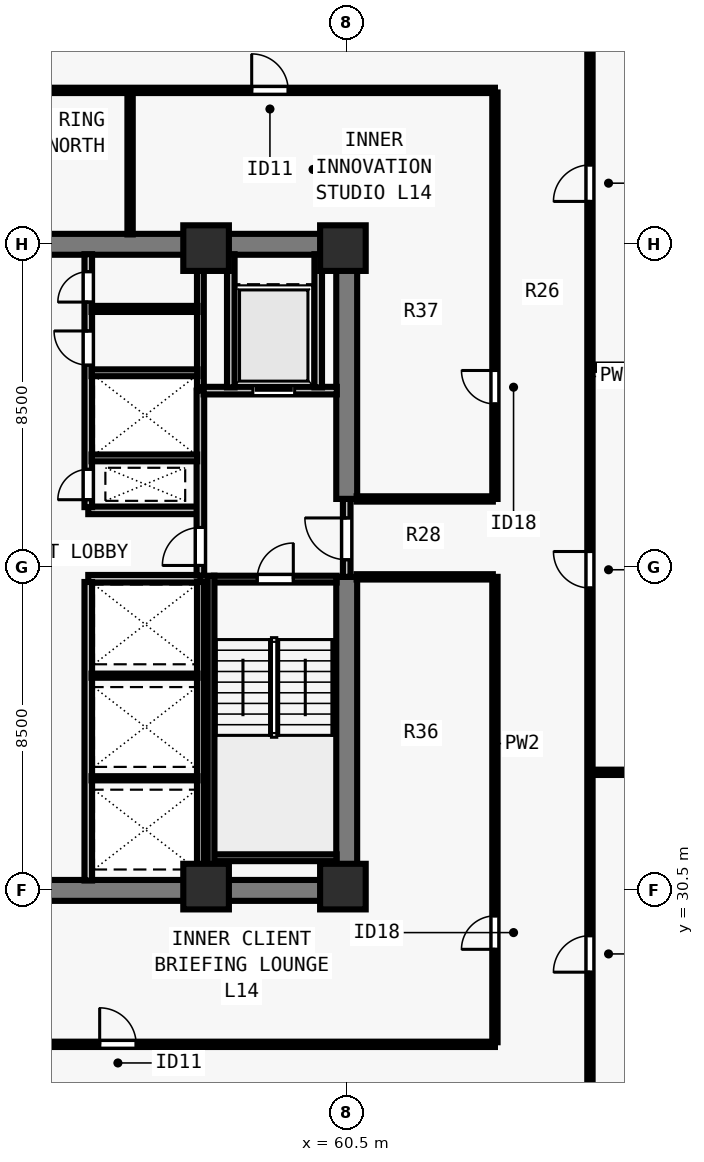
"""IFC4 building model, lengths in metres.
Left out: names, types, materials, properties, quantities, classifications, styles, units other than length and angle.
Written with IfcOpenShell. Run it as: python <this file> out.ifc"""

import sys

from ifc_helpers import new_model, si_unit, direction, frame, frame_2d, origin, origin_2d, place, context, subcontext, project, spatial, rectangle, extrude, element, fill, save


model = new_model("IFC4")
c1 = context("Model", 3, precision=1e-05, world=origin(), true_north=direction((0.0, 1.0)))
c2 = subcontext(c1, "Body", "Model", "MODEL_VIEW")
j1 = project(units=[si_unit("LENGTHUNIT", "METRE"), si_unit("PLANEANGLEUNIT", "RADIAN")], contexts=[c1])
p1 = place(None, origin())
s1 = spatial("IfcSite", under=j1, at=p1, CompositionType="ELEMENT")
p2 = place(p1, origin())
s2 = spatial("IfcBuilding", under=s1, at=p2, CompositionType="ELEMENT")
p3 = place(p2, frame((0.0, 0.0, 55.0)))
s3 = spatial("IfcBuildingStorey", under=s2, at=p3, CompositionType="ELEMENT", Elevation=55.0)
for number, where, z_axis, x_axis in (
    (1, (56.8, 30.6, 0.0), (0.0, 0.0, 1.0), (1.0, 0.0, 0.0)),
    (2, (60.4, 30.6, 0.0), (0.0, 0.0, 1.0), (1.0, 0.0, 0.0)),
    (3, (56.8, 47.4, 0.0), (0.0, 0.0, 1.0), (1.0, 0.0, 0.0)),
    (4, (60.4, 47.4, 0.0), (0.0, 0.0, 1.0), (1.0, 0.0, 0.0)),
):
    element("IfcColumn", number, at=place(p3, frame(where, z_axis=z_axis, x_axis=x_axis)), inside=s3, PredefinedType="COLUMN", context=c2, shape_type="SweptSolid", body=[
        extrude(rectangle(XDim=1.2, YDim=1.2, at=origin_2d()), origin(), (0.0, 0.0, 1.0), 3.5),
    ])
for number, where, z_axis, x_axis in (
    (5, (43.225, 30.5, 0.0), (0.0, 0.0, 1.0), (1.0, 0.0, 0.0)),
    (6, (43.225, 47.5, 0.0), (0.0, 0.0, 1.0), (1.0, 0.0, 0.0)),
):
    element("IfcWall", number, at=place(p3, frame(where, z_axis=z_axis, x_axis=x_axis)), inside=s3, PredefinedType="SHEAR", context=c2, shape_type="SweptSolid", body=[
        extrude(rectangle(XDim=17.55, YDim=0.55, at=frame_2d((8.775, 0.0))), origin(), (0.0, 0.0, 1.0), 3.28),
    ])
p4 = place(p3, frame((60.5, 30.765, 0.0), z_axis=(0.0, 0.0, 1.0), x_axis=(0.0, 1.0, 0.0)))
e7 = element("IfcWall", 7, at=p4, inside=s3, PredefinedType="SHEAR", context=c2, shape_type="SweptSolid", body=[
    extrude(rectangle(XDim=7.985, YDim=0.55, at=frame_2d((3.993, 0.0))), origin(), (0.0, 0.0, 1.0), 3.28),
])
p5 = place(p3, frame((60.5, 40.8, 0.0), z_axis=(0.0, 0.0, 1.0), x_axis=(0.0, 1.0, 0.0)))
e8 = element("IfcWall", 8, at=p5, inside=s3, PredefinedType="SHEAR", context=c2, shape_type="SweptSolid", body=[
    extrude(rectangle(XDim=6.435, YDim=0.55, at=frame_2d((3.218, 0.0))), origin(), (0.0, 0.0, 1.0), 3.28),
])
for number, where, z_axis, x_axis in (
    (9, (53.7, 38.7, 0.0), (0.0, 0.0, 1.0), (1.0, 0.0, 0.0)),
    (10, (53.7, 40.5, 0.0), (0.0, 0.0, 1.0), (1.0, 0.0, 0.0)),
):
    element("IfcWall", number, at=place(p3, frame(where, z_axis=z_axis, x_axis=x_axis)), inside=s3, PredefinedType="SOLIDWALL", context=c2, shape_type="SweptSolid", body=[
        extrude(rectangle(XDim=2.95, YDim=0.2, at=frame_2d((1.475, 0.0))), origin(), (0.0, 0.0, 1.0), 3.28),
    ])
p6 = place(p3, frame((53.7, 30.76, 0.0), z_axis=(0.0, 0.0, 1.0), x_axis=(0.0, 1.0, 0.0)))
e11 = element("IfcWall", 11, at=p6, inside=s3, PredefinedType="SOLIDWALL", context=c2, shape_type="SweptSolid", body=[
    extrude(rectangle(XDim=7.855, YDim=0.2, at=frame_2d((3.927, 0.0))), origin(), (0.0, 0.0, 1.0), 3.28),
])
p7 = place(p3, frame((53.7, 40.585, 0.0), z_axis=(0.0, 0.0, 1.0), x_axis=(0.0, 1.0, 0.0)))
e12 = element("IfcWall", 12, at=p7, inside=s3, PredefinedType="SOLIDWALL", context=c2, shape_type="SweptSolid", body=[
    extrude(rectangle(XDim=6.655, YDim=0.2, at=frame_2d((3.328, 0.0))), origin(), (0.0, 0.0, 1.0), 3.28),
])
p8 = place(p7, frame((0.195, 0.0, 0.0)))
e13 = element("IfcOpeningElement", 13, at=p8, cuts=e12, PredefinedType="OPENING", context=c2, shape_type="SweptSolid", body=[
    extrude(rectangle(XDim=0.8, YDim=2.08, at=frame_2d((0.4, 1.04))), frame((0.0, 0.11, 0.0), z_axis=(0.0, -1.0, 0.0), x_axis=(1.0, 0.0, 0.0)), (0.0, 0.0, 1.0), 0.22),
])
p9 = place(p7, frame((3.735, 0.0, 0.0)))
e14 = element("IfcOpeningElement", 14, at=p9, cuts=e12, PredefinedType="OPENING", context=c2, shape_type="SweptSolid", body=[
    extrude(rectangle(XDim=0.9, YDim=2.12, at=frame_2d((0.45, 1.06))), frame((0.0, 0.11, 0.0), z_axis=(0.0, -1.0, 0.0), x_axis=(1.0, 0.0, 0.0)), (0.0, 0.0, 1.0), 0.22),
])
p10 = place(p7, frame((5.395, 0.0, 0.0)))
e15 = element("IfcOpeningElement", 15, at=p10, cuts=e12, PredefinedType="OPENING", context=c2, shape_type="SweptSolid", body=[
    extrude(rectangle(XDim=0.8, YDim=2.1, at=frame_2d((0.4, 1.05))), frame((0.0, 0.11, 0.0), z_axis=(0.0, -1.0, 0.0), x_axis=(1.0, 0.0, 0.0)), (0.0, 0.0, 1.0), 0.22),
])
p11 = place(p3, frame((60.5, 38.75, 0.0), z_axis=(0.0, 0.0, 1.0), x_axis=(0.0, 1.0, 0.0)))
e16 = element("IfcWall", 16, at=p11, inside=s3, PredefinedType="SOLIDWALL", context=c2, shape_type="SweptSolid", body=[
    extrude(rectangle(XDim=2.05, YDim=0.2, at=frame_2d((1.025, 0.0))), origin(), (0.0, 0.0, 1.0), 3.28),
])
p12 = place(p11, frame((0.45, 0.0, 0.0)))
e17 = element("IfcOpeningElement", 17, at=p12, cuts=e16, PredefinedType="OPENING", context=c2, shape_type="SweptSolid", body=[
    extrude(rectangle(XDim=1.1, YDim=2.15, at=frame_2d((0.55, 1.075))), frame((0.0, 0.11, 0.0), z_axis=(0.0, -1.0, 0.0), x_axis=(1.0, 0.0, 0.0)), (0.0, 0.0, 1.0), 0.22),
])
p13 = place(p3, frame((56.65, 38.785, 0.0), z_axis=(0.0, 0.0, 1.0), x_axis=(0.0, 1.0, 0.0)))
e18 = element("IfcWall", 18, at=p13, inside=s3, PredefinedType="SOLIDWALL", context=c2, shape_type="SweptSolid", body=[
    extrude(rectangle(XDim=4.865, YDim=0.2, at=frame_2d((2.433, 0.0))), origin(), (0.0, 0.0, 1.0), 3.28),
])
p14 = place(p13, frame((0.265, 0.0, 0.0)))
e19 = element("IfcOpeningElement", 19, at=p14, cuts=e18, PredefinedType="OPENING", context=c2, shape_type="SweptSolid", body=[
    extrude(rectangle(XDim=1.0, YDim=2.15, at=frame_2d((0.5, 1.075))), frame((0.0, 0.11, 0.0), z_axis=(0.0, -1.0, 0.0), x_axis=(1.0, 0.0, 0.0)), (0.0, 0.0, 1.0), 0.22),
])
p15 = place(p3, frame((56.735, 43.65, 0.0), z_axis=(0.0, 0.0, 1.0), x_axis=(1.0, 0.0, 0.0)))
e20 = element("IfcWall", 20, at=p15, inside=s3, PredefinedType="SOLIDWALL", context=c2, shape_type="SweptSolid", body=[
    extrude(rectangle(XDim=3.505, YDim=0.2, at=frame_2d((1.752, 0.0))), origin(), (0.0, 0.0, 1.0), 3.28),
])
p16 = place(p15, frame((1.295, 0.0, 0.0)))
e21 = element("IfcOpeningElement", 21, at=p16, cuts=e20, PredefinedType="OPENING", context=c2, shape_type="SweptSolid", body=[
    extrude(rectangle(XDim=1.1, YDim=2.2, at=frame_2d((0.55, 1.1))), frame((0.0, 0.11, 0.0), z_axis=(0.0, -1.0, 0.0), x_axis=(1.0, 0.0, 0.0)), (0.0, 0.0, 1.0), 0.22),
])
for number, where, z_axis, x_axis in (
    (22, (57.45, 43.735, 0.0), (0.0, 0.0, 1.0), (0.0, 1.0, 0.0)),
    (23, (59.75, 43.735, 0.0), (0.0, 0.0, 1.0), (0.0, 1.0, 0.0)),
):
    element("IfcWall", number, at=place(p3, frame(where, z_axis=z_axis, x_axis=x_axis)), inside=s3, PredefinedType="SOLIDWALL", context=c2, shape_type="SweptSolid", body=[
        extrude(rectangle(XDim=3.505, YDim=0.2, at=frame_2d((1.752, 0.0))), origin(), (0.0, 0.0, 1.0), 3.28),
    ])
p17 = place(p3, frame((56.65, 30.76, 0.0), z_axis=(0.0, 0.0, 1.0), x_axis=(0.0, 1.0, 0.0)))
e24 = element("IfcWall", 24, at=p17, inside=s3, PredefinedType="SOLIDWALL", context=c2, shape_type="SweptSolid", body=[
    extrude(rectangle(XDim=7.855, YDim=0.18, at=frame_2d((3.927, 0.0))), origin(), (0.0, 0.0, 1.0), 3.28),
])
for number, where, z_axis, x_axis in (
    (25, (53.785, 33.45, 0.0), (0.0, 0.0, 1.0), (1.0, 0.0, 0.0)),
    (26, (53.785, 36.15, 0.0), (0.0, 0.0, 1.0), (1.0, 0.0, 0.0)),
):
    element("IfcWall", number, at=place(p3, frame(where, z_axis=z_axis, x_axis=x_axis)), inside=s3, PredefinedType="PARTITIONING", context=c2, shape_type="SweptSolid", body=[
        extrude(rectangle(XDim=2.79, YDim=0.11, at=frame_2d((1.395, 0.0))), origin(), (0.0, 0.0, 1.0), 3.28),
    ])
p18 = place(p3, frame((56.65, 43.735, 0.0), z_axis=(0.0, 0.0, 1.0), x_axis=(0.0, 1.0, 0.0)))
e27 = element("IfcWall", 27, at=p18, inside=s3, PredefinedType="SOLIDWALL", context=c2, shape_type="SweptSolid", body=[
    extrude(rectangle(XDim=3.505, YDim=0.18, at=frame_2d((1.752, 0.0))), origin(), (0.0, 0.0, 1.0), 3.28),
])
p19 = place(p3, frame((53.785, 41.88, 0.0), z_axis=(0.0, 0.0, 1.0), x_axis=(1.0, 0.0, 0.0)))
e28 = element("IfcWall", 28, at=p19, inside=s3, PredefinedType="SOLIDWALL", context=c2, shape_type="SweptSolid", body=[
    extrude(rectangle(XDim=2.78, YDim=0.18, at=frame_2d((1.39, 0.0))), origin(), (0.0, 0.0, 1.0), 3.28),
])
p20 = place(p3, frame((53.785, 44.12, 0.0), z_axis=(0.0, 0.0, 1.0), x_axis=(1.0, 0.0, 0.0)))
e29 = element("IfcWall", 29, at=p20, inside=s3, PredefinedType="SOLIDWALL", context=c2, shape_type="SweptSolid", body=[
    extrude(rectangle(XDim=2.79, YDim=0.18, at=frame_2d((1.395, 0.0))), origin(), (0.0, 0.0, 1.0), 3.28),
])
p21 = place(p3, frame((53.785, 45.8, 0.0), z_axis=(0.0, 0.0, 1.0), x_axis=(1.0, 0.0, 0.0)))
e30 = element("IfcWall", 30, at=p21, inside=s3, PredefinedType="PARTITIONING", context=c2, shape_type="SweptSolid", body=[
    extrude(rectangle(XDim=2.79, YDim=0.16, at=frame_2d((1.395, 0.0))), origin(), (0.0, 0.0, 1.0), 3.28),
])
p22 = place(p3, frame((66.9, 24.005, 0.0), z_axis=(0.0, 0.0, 1.0), x_axis=(0.0, 1.0, 0.0)))
e31 = element("IfcWall", 31, at=p22, inside=s3, PredefinedType="PARTITIONING", context=c2, shape_type="SweptSolid", body=[
    extrude(rectangle(XDim=29.99, YDim=0.14, at=frame_2d((14.995, 0.0))), origin(), (0.0, 0.0, 1.0), 3.28),
])
p23 = place(p22, frame((4.344, 0.0, 0.0)))
e32 = element("IfcOpeningElement", 32, at=p23, cuts=e31, PredefinedType="OPENING", context=c2, shape_type="SweptSolid", body=[
    extrude(rectangle(XDim=0.96, YDim=2.12, at=frame_2d((0.48, 1.06))), frame((0.0, 0.08, 0.0), z_axis=(0.0, -1.0, 0.0), x_axis=(1.0, 0.0, 0.0)), (0.0, 0.0, 1.0), 0.16),
])
p24 = place(p22, frame((14.452, 0.0, 0.0)))
e33 = element("IfcOpeningElement", 33, at=p24, cuts=e31, PredefinedType="OPENING", context=c2, shape_type="SweptSolid", body=[
    extrude(rectangle(XDim=0.96, YDim=2.12, at=frame_2d((0.48, 1.06))), frame((0.0, 0.08, 0.0), z_axis=(0.0, -1.0, 0.0), x_axis=(1.0, 0.0, 0.0)), (0.0, 0.0, 1.0), 0.16),
])
p25 = place(p22, frame((24.623, 0.0, 0.0)))
e34 = element("IfcOpeningElement", 34, at=p25, cuts=e31, PredefinedType="OPENING", context=c2, shape_type="SweptSolid", body=[
    extrude(rectangle(XDim=0.96, YDim=2.12, at=frame_2d((0.48, 1.06))), frame((0.0, 0.08, 0.0), z_axis=(0.0, -1.0, 0.0), x_axis=(1.0, 0.0, 0.0)), (0.0, 0.0, 1.0), 0.16),
])
p26 = place(p3, frame((39.6, 26.45, 0.0), z_axis=(0.0, 0.0, 1.0), x_axis=(1.0, 0.0, 0.0)))
e35 = element("IfcWall", 35, at=p26, inside=s3, PredefinedType="PARTITIONING", context=c2, shape_type="SweptSolid", body=[
    extrude(rectangle(XDim=24.8, YDim=0.14, at=frame_2d((12.4, 0.0))), origin(), (0.0, 0.0, 1.0), 3.28),
])
p27 = place(p26, frame((2.2, 0.0, 0.0)))
e36 = element("IfcOpeningElement", 36, at=p27, cuts=e35, PredefinedType="OPENING", context=c2, shape_type="SweptSolid", body=[
    extrude(rectangle(XDim=0.96, YDim=2.12, at=frame_2d((0.48, 1.06))), frame((0.0, 0.08, 0.0), z_axis=(0.0, -1.0, 0.0), x_axis=(1.0, 0.0, 0.0)), (0.0, 0.0, 1.0), 0.16),
])
p28 = place(p26, frame((14.4, 0.0, 0.0)))
e37 = element("IfcOpeningElement", 37, at=p28, cuts=e35, PredefinedType="OPENING", context=c2, shape_type="SweptSolid", body=[
    extrude(rectangle(XDim=0.96, YDim=2.12, at=frame_2d((0.48, 1.06))), frame((0.0, 0.08, 0.0), z_axis=(0.0, -1.0, 0.0), x_axis=(1.0, 0.0, 0.0)), (0.0, 0.0, 1.0), 0.16),
])
p29 = place(p3, frame((39.6, 51.55, 0.0), z_axis=(0.0, 0.0, 1.0), x_axis=(1.0, 0.0, 0.0)))
e38 = element("IfcWall", 38, at=p29, inside=s3, PredefinedType="PARTITIONING", context=c2, shape_type="SweptSolid", body=[
    extrude(rectangle(XDim=24.8, YDim=0.14, at=frame_2d((12.4, 0.0))), origin(), (0.0, 0.0, 1.0), 3.28),
])
p30 = place(p29, frame((3.2, 0.0, 0.0)))
e39 = element("IfcOpeningElement", 39, at=p30, cuts=e38, PredefinedType="OPENING", context=c2, shape_type="SweptSolid", body=[
    extrude(rectangle(XDim=0.96, YDim=2.12, at=frame_2d((0.48, 1.06))), frame((0.0, 0.08, 0.0), z_axis=(0.0, -1.0, 0.0), x_axis=(1.0, 0.0, 0.0)), (0.0, 0.0, 1.0), 0.16),
])
p31 = place(p29, frame((18.4, 0.0, 0.0)))
e40 = element("IfcOpeningElement", 40, at=p31, cuts=e38, PredefinedType="OPENING", context=c2, shape_type="SweptSolid", body=[
    extrude(rectangle(XDim=0.96, YDim=2.12, at=frame_2d((0.48, 1.06))), frame((0.0, 0.08, 0.0), z_axis=(0.0, -1.0, 0.0), x_axis=(1.0, 0.0, 0.0)), (0.0, 0.0, 1.0), 0.16),
])
p32 = place(p3, frame((64.4, 26.505, 0.0), z_axis=(0.0, 0.0, 1.0), x_axis=(0.0, 1.0, 0.0)))
e41 = element("IfcWall", 41, at=p32, inside=s3, PredefinedType="PARTITIONING", context=c2, shape_type="SweptSolid", body=[
    extrude(rectangle(XDim=12.245, YDim=0.14, at=frame_2d((6.123, 0.0))), origin(), (0.0, 0.0, 1.0), 3.28),
])
p33 = place(p32, frame((2.445, 0.0, 0.0)))
e42 = element("IfcOpeningElement", 42, at=p33, cuts=e41, PredefinedType="OPENING", context=c2, shape_type="SweptSolid", body=[
    extrude(rectangle(XDim=0.88, YDim=2.1, at=frame_2d((0.44, 1.05))), frame((0.0, 0.08, 0.0), z_axis=(0.0, -1.0, 0.0), x_axis=(1.0, 0.0, 0.0)), (0.0, 0.0, 1.0), 0.16),
])
p34 = place(p3, frame((64.4, 40.8, 0.0), z_axis=(0.0, 0.0, 1.0), x_axis=(0.0, 1.0, 0.0)))
e43 = element("IfcWall", 43, at=p34, inside=s3, PredefinedType="PARTITIONING", context=c2, shape_type="SweptSolid", body=[
    extrude(rectangle(XDim=10.695, YDim=0.14, at=frame_2d((5.348, 0.0))), origin(), (0.0, 0.0, 1.0), 3.28),
])
p35 = place(p34, frame((2.5, 0.0, 0.0)))
e44 = element("IfcOpeningElement", 44, at=p35, cuts=e43, PredefinedType="OPENING", context=c2, shape_type="SweptSolid", body=[
    extrude(rectangle(XDim=0.88, YDim=2.1, at=frame_2d((0.44, 1.05))), frame((0.0, 0.08, 0.0), z_axis=(0.0, -1.0, 0.0), x_axis=(1.0, 0.0, 0.0)), (0.0, 0.0, 1.0), 0.16),
])
for number, where, z_axis, x_axis in (
    (45, (60.76, 38.75, 0.0), (0.0, 0.0, 1.0), (1.0, 0.0, 0.0)),
    (46, (60.76, 40.8, 0.0), (0.0, 0.0, 1.0), (1.0, 0.0, 0.0)),
):
    element("IfcWall", number, at=place(p3, frame(where, z_axis=z_axis, x_axis=x_axis)), inside=s3, PredefinedType="PARTITIONING", context=c2, shape_type="SweptSolid", body=[
        extrude(rectangle(XDim=3.585, YDim=0.14, at=frame_2d((1.792, 0.0))), origin(), (0.0, 0.0, 1.0), 3.28),
    ])
p36 = place(p3, frame((54.8, 47.76, 0.0), z_axis=(0.0, 0.0, 1.0), x_axis=(0.0, 1.0, 0.0)))
e47 = element("IfcWall", 47, at=p36, inside=s3, PredefinedType="PARTITIONING", context=c2, shape_type="SweptSolid", body=[
    extrude(rectangle(XDim=3.735, YDim=0.14, at=frame_2d((1.868, 0.0))), origin(), (0.0, 0.0, 1.0), 3.28),
])
for number, where, z_axis, x_axis in (
    (48, (67.0, 33.607, 0.0), (0.0, 0.0, 1.0), (1.0, 0.0, 0.0)),
    (49, (67.0, 44.267, 0.0), (0.0, 0.0, 1.0), (1.0, 0.0, 0.0)),
):
    element("IfcWall", number, at=place(p3, frame(where, z_axis=z_axis, x_axis=x_axis)), inside=s3, PredefinedType="PARTITIONING", context=c2, shape_type="SweptSolid", body=[
        extrude(rectangle(XDim=10.08, YDim=0.14, at=frame_2d((5.04, 0.0))), origin(), (0.0, 0.0, 1.0), 2.439),
    ])
p37 = place(p3, frame((57.005, 38.69, 0.0), z_axis=(0.0, 0.0, 1.0), x_axis=(1.0, 0.0, 0.0)))
e50 = element("IfcWall", 50, at=p37, inside=s3, PredefinedType="SOLIDWALL", context=c2, shape_type="SweptSolid", body=[
    extrude(rectangle(XDim=3.23, YDim=0.18, at=frame_2d((1.615, 0.0))), origin(), (0.0, 0.0, 1.0), 3.28),
])
p38 = place(p37, frame((1.14, 0.0, 0.0)))
e51 = element("IfcOpeningElement", 51, at=p38, cuts=e50, PredefinedType="OPENING", context=c2, shape_type="SweptSolid", body=[
    extrude(rectangle(XDim=0.95, YDim=2.15, at=frame_2d((0.475, 1.075))), frame((0.0, 0.1, 0.0), z_axis=(0.0, -1.0, 0.0), x_axis=(1.0, 0.0, 0.0)), (0.0, 0.0, 1.0), 0.2),
])
p39 = place(p3, frame((57.005, 31.36, 0.0), z_axis=(0.0, 0.0, 1.0), x_axis=(1.0, 0.0, 0.0)))
e52 = element("IfcWall", 52, at=p39, inside=s3, PredefinedType="SOLIDWALL", context=c2, shape_type="SweptSolid", body=[
    extrude(rectangle(XDim=3.23, YDim=0.18, at=frame_2d((1.615, 0.0))), origin(), (0.0, 0.0, 1.0), 3.28),
])
p40 = place(p3, frame((56.93, 38.78, 0.0), z_axis=(0.0, 0.0, 1.0), x_axis=(0.0, -1.0, 0.0)))
e53 = element("IfcWall", 53, at=p40, inside=s3, PredefinedType="SOLIDWALL", context=c2, shape_type="SweptSolid", body=[
    extrude(rectangle(XDim=8.017, YDim=0.18, at=frame_2d((4.009, 0.0))), origin(), (0.0, 0.0, 1.0), 3.28),
])
p41 = place(p12, origin())
e54 = element("IfcDoor", 54, at=p41, inside=s3, OperationType="SINGLE_SWING_RIGHT", PredefinedType="DOOR", context=c2, shape_type="SweptSolid", body=[
    extrude(rectangle(XDim=1.1, YDim=2.15, at=frame_2d((0.55, 1.075))), frame((0.0, 0.025, 0.0), z_axis=(0.0, -1.0, 0.0), x_axis=(1.0, 0.0, 0.0)), (0.0, 0.0, 1.0), 0.05),
])
fill(e17, e54)
p42 = place(p14, origin())
e55 = element("IfcDoor", 55, at=p42, inside=s3, OperationType="SINGLE_SWING_LEFT", PredefinedType="DOOR", context=c2, shape_type="SweptSolid", body=[
    extrude(rectangle(XDim=1.0, YDim=2.15, at=frame_2d((0.5, 1.075))), frame((0.0, 0.025, 0.0), z_axis=(0.0, -1.0, 0.0), x_axis=(1.0, 0.0, 0.0)), (0.0, 0.0, 1.0), 0.05),
])
fill(e19, e55)
p43 = place(p16, origin())
e56 = element("IfcDoor", 56, at=p43, inside=s3, OperationType="SLIDING_TO_LEFT", PredefinedType="DOOR", context=c2, shape_type="SweptSolid", body=[
    extrude(rectangle(XDim=1.1, YDim=2.2, at=frame_2d((0.55, 1.1))), frame((0.0, 0.025, 0.0), z_axis=(0.0, -1.0, 0.0), x_axis=(1.0, 0.0, 0.0)), (0.0, 0.0, 1.0), 0.05),
])
fill(e21, e56)
p44 = place(p8, origin())
e57 = element("IfcDoor", 57, at=p44, inside=s3, OperationType="SINGLE_SWING_LEFT", PredefinedType="DOOR", context=c2, shape_type="SweptSolid", body=[
    extrude(rectangle(XDim=0.8, YDim=2.08, at=frame_2d((0.4, 1.04))), frame((0.0, 0.025, 0.0), z_axis=(0.0, -1.0, 0.0), x_axis=(1.0, 0.0, 0.0)), (0.0, 0.0, 1.0), 0.05),
])
fill(e13, e57)
p45 = place(p9, origin())
e58 = element("IfcDoor", 58, at=p45, inside=s3, OperationType="SINGLE_SWING_RIGHT", PredefinedType="DOOR", context=c2, shape_type="SweptSolid", body=[
    extrude(rectangle(XDim=0.9, YDim=2.12, at=frame_2d((0.45, 1.06))), frame((0.0, 0.025, 0.0), z_axis=(0.0, -1.0, 0.0), x_axis=(1.0, 0.0, 0.0)), (0.0, 0.0, 1.0), 0.05),
])
fill(e14, e58)
p46 = place(p10, origin())
e59 = element("IfcDoor", 59, at=p46, inside=s3, OperationType="SINGLE_SWING_LEFT", PredefinedType="DOOR", context=c2, shape_type="SweptSolid", body=[
    extrude(rectangle(XDim=0.8, YDim=2.1, at=frame_2d((0.4, 1.05))), frame((0.0, 0.025, 0.0), z_axis=(0.0, -1.0, 0.0), x_axis=(1.0, 0.0, 0.0)), (0.0, 0.0, 1.0), 0.05),
])
fill(e15, e59)
p47 = place(p28, origin())
e60 = element("IfcDoor", 60, at=p47, inside=s3, OperationType="SINGLE_SWING_LEFT", PredefinedType="DOOR", context=c2, shape_type="SweptSolid", body=[
    extrude(rectangle(XDim=0.96, YDim=2.12, at=frame_2d((0.48, 1.06))), frame((0.0, 0.025, 0.0), z_axis=(0.0, -1.0, 0.0), x_axis=(1.0, 0.0, 0.0)), (0.0, 0.0, 1.0), 0.05),
])
fill(e37, e60)
p48 = place(p31, origin())
e61 = element("IfcDoor", 61, at=p48, inside=s3, OperationType="SINGLE_SWING_LEFT", PredefinedType="DOOR", context=c2, shape_type="SweptSolid", body=[
    extrude(rectangle(XDim=0.96, YDim=2.12, at=frame_2d((0.48, 1.06))), frame((0.0, 0.025, 0.0), z_axis=(0.0, -1.0, 0.0), x_axis=(1.0, 0.0, 0.0)), (0.0, 0.0, 1.0), 0.05),
])
fill(e40, e61)
p49 = place(p33, origin())
e62 = element("IfcDoor", 62, at=p49, inside=s3, OperationType="SINGLE_SWING_LEFT", PredefinedType="DOOR", context=c2, shape_type="SweptSolid", body=[
    extrude(rectangle(XDim=0.88, YDim=2.1, at=frame_2d((0.44, 1.05))), frame((0.0, 0.025, 0.0), z_axis=(0.0, -1.0, 0.0), x_axis=(1.0, 0.0, 0.0)), (0.0, 0.0, 1.0), 0.05),
])
fill(e42, e62)
p50 = place(p35, origin())
e63 = element("IfcDoor", 63, at=p50, inside=s3, OperationType="SINGLE_SWING_RIGHT", PredefinedType="DOOR", context=c2, shape_type="SweptSolid", body=[
    extrude(rectangle(XDim=0.88, YDim=2.1, at=frame_2d((0.44, 1.05))), frame((0.0, 0.025, 0.0), z_axis=(0.0, -1.0, 0.0), x_axis=(1.0, 0.0, 0.0)), (0.0, 0.0, 1.0), 0.05),
])
fill(e44, e63)
p51 = place(p23, origin())
e64 = element("IfcDoor", 64, at=p51, inside=s3, OperationType="SINGLE_SWING_LEFT", PredefinedType="DOOR", context=c2, shape_type="SweptSolid", body=[
    extrude(rectangle(XDim=0.96, YDim=2.12, at=frame_2d((0.48, 1.06))), frame((0.0, 0.025, 0.0), z_axis=(0.0, -1.0, 0.0), x_axis=(1.0, 0.0, 0.0)), (0.0, 0.0, 1.0), 0.05),
])
fill(e32, e64)
p52 = place(p24, origin())
e65 = element("IfcDoor", 65, at=p52, inside=s3, OperationType="SINGLE_SWING_RIGHT", PredefinedType="DOOR", context=c2, shape_type="SweptSolid", body=[
    extrude(rectangle(XDim=0.96, YDim=2.12, at=frame_2d((0.48, 1.06))), frame((0.0, 0.025, 0.0), z_axis=(0.0, -1.0, 0.0), x_axis=(1.0, 0.0, 0.0)), (0.0, 0.0, 1.0), 0.05),
])
fill(e33, e65)
p53 = place(p25, origin())
e66 = element("IfcDoor", 66, at=p53, inside=s3, OperationType="SINGLE_SWING_LEFT", PredefinedType="DOOR", context=c2, shape_type="SweptSolid", body=[
    extrude(rectangle(XDim=0.96, YDim=2.12, at=frame_2d((0.48, 1.06))), frame((0.0, 0.025, 0.0), z_axis=(0.0, -1.0, 0.0), x_axis=(1.0, 0.0, 0.0)), (0.0, 0.0, 1.0), 0.05),
])
fill(e34, e66)
p54 = place(p38, origin())
e67 = element("IfcDoor", 67, at=p54, inside=s3, OperationType="SINGLE_SWING_RIGHT", PredefinedType="DOOR", context=c2, shape_type="SweptSolid", body=[
    extrude(rectangle(XDim=0.95, YDim=2.15, at=frame_2d((0.475, 1.075))), frame((0.0, 0.025, 0.0), z_axis=(0.0, -1.0, 0.0), x_axis=(1.0, 0.0, 0.0)), (0.0, 0.0, 1.0), 0.05),
])
fill(e51, e67)
save(model, sys.argv[1])
